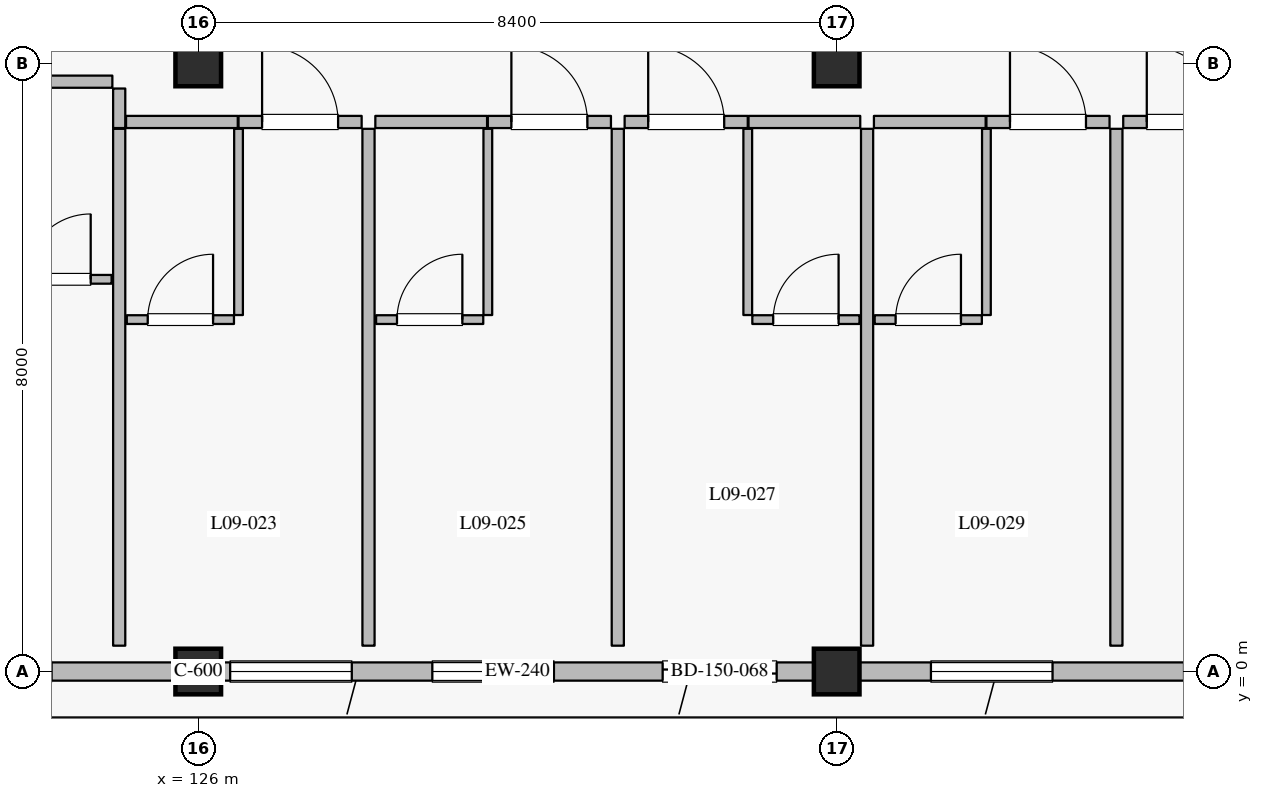
"""IFC4 building model, lengths in metres.
Left out: names, types, materials, properties, quantities, classifications, styles, units other than length and angle.
Written with IfcOpenShell. Run it as: python <this file> out.ifc"""

import sys

from ifc_helpers import new_model, si_unit, direction, frame, frame_2d, origin, origin_2d, place, context, subcontext, project, spatial, rectangle, extrude, element, fill, save


model = new_model("IFC4")
c1 = context("Model", 3, precision=1e-05, world=origin(), true_north=direction((0.0, 1.0)))
c2 = subcontext(c1, "Body", "Model", "MODEL_VIEW")
j1 = project(units=[si_unit("LENGTHUNIT", "METRE"), si_unit("PLANEANGLEUNIT", "RADIAN")], contexts=[c1])
p1 = place(None, origin())
s1 = spatial("IfcSite", under=j1, at=p1, CompositionType="ELEMENT")
p2 = place(p1, origin())
s2 = spatial("IfcBuilding", under=s1, at=p2, CompositionType="ELEMENT")
p3 = place(p2, frame((0.0, 0.0, 39.6)))
s3 = spatial("IfcBuildingStorey", under=s2, at=p3, CompositionType="ELEMENT", Elevation=39.6)
for number, where, z_axis, x_axis in (
    (1, (126.0, 0.0, 0.0), (0.0, 0.0, 1.0), (1.0, 0.0, 0.0)),
    (2, (134.4, 0.0, 0.0), (0.0, 0.0, 1.0), (1.0, 0.0, 0.0)),
    (3, (126.0, 8.0, 0.0), (0.0, 0.0, 1.0), (1.0, 0.0, 0.0)),
    (4, (134.4, 8.0, 0.0), (0.0, 0.0, 1.0), (1.0, 0.0, 0.0)),
):
    element("IfcColumn", number, at=place(p3, frame(where, z_axis=z_axis, x_axis=x_axis)), inside=s3, PredefinedType="COLUMN", context=c2, shape_type="SweptSolid", body=[
        extrude(rectangle(XDim=0.6, YDim=0.6, at=origin_2d()), origin(), (0.0, 0.0, 1.0), 3.6),
    ])
p4 = place(p3, frame((125.7, 0.0, 0.0), z_axis=(0.0, 0.0, 1.0), x_axis=(-1.0, 0.0, 0.0)))
e5 = element("IfcWall", 5, at=p4, inside=s3, PredefinedType="SOLIDWALL", context=c2, shape_type="SweptSolid", body=[
    extrude(rectangle(XDim=7.8, YDim=0.24, at=frame_2d((3.9, 0.0))), origin(), (0.0, 0.0, 1.0), 2.89),
])
p5 = place(p4, frame((1.63, 0.0, 0.0)))
e6 = element("IfcOpeningElement", 6, at=p5, cuts=e5, PredefinedType="OPENING", context=c2, shape_type="SweptSolid", body=[
    extrude(rectangle(XDim=1.5, YDim=2.25, at=frame_2d((0.75, 1.125))), frame((0.0, 0.13, 0.0), z_axis=(0.0, -1.0, 0.0), x_axis=(1.0, 0.0, 0.0)), (0.0, 0.0, 1.0), 0.26),
])
p6 = place(p4, frame((4.86, 0.0, 0.8)))
e7 = element("IfcOpeningElement", 7, at=p6, cuts=e5, PredefinedType="OPENING", context=c2, shape_type="SweptSolid", body=[
    extrude(rectangle(XDim=1.6, YDim=1.6, at=frame_2d((0.8, 0.8))), frame((0.0, 0.13, 0.0), z_axis=(0.0, -1.0, 0.0), x_axis=(1.0, 0.0, 0.0)), (0.0, 0.0, 1.0), 0.26),
])
p7 = place(p3, frame((134.1, 0.0, 0.0), z_axis=(0.0, 0.0, 1.0), x_axis=(-1.0, 0.0, 0.0)))
e8 = element("IfcWall", 8, at=p7, inside=s3, PredefinedType="SOLIDWALL", context=c2, shape_type="SweptSolid", body=[
    extrude(rectangle(XDim=7.8, YDim=0.24, at=frame_2d((3.9, 0.0))), origin(), (0.0, 0.0, 1.0), 2.89),
])
p8 = place(p7, frame((0.49, 0.0, 0.0)))
e9 = element("IfcOpeningElement", 9, at=p8, cuts=e8, PredefinedType="OPENING", context=c2, shape_type="SweptSolid", body=[
    extrude(rectangle(XDim=1.5, YDim=2.25, at=frame_2d((0.75, 1.125))), frame((0.0, 0.13, 0.0), z_axis=(0.0, -1.0, 0.0), x_axis=(1.0, 0.0, 0.0)), (0.0, 0.0, 1.0), 0.26),
])
p9 = place(p7, frame((3.42, 0.0, 0.8)))
e10 = element("IfcOpeningElement", 10, at=p9, cuts=e8, PredefinedType="OPENING", context=c2, shape_type="SweptSolid", body=[
    extrude(rectangle(XDim=1.6, YDim=1.6, at=frame_2d((0.8, 0.8))), frame((0.0, 0.13, 0.0), z_axis=(0.0, -1.0, 0.0), x_axis=(1.0, 0.0, 0.0)), (0.0, 0.0, 1.0), 0.26),
])
p10 = place(p7, frame((6.08, 0.0, 0.8)))
e11 = element("IfcOpeningElement", 11, at=p10, cuts=e8, PredefinedType="OPENING", context=c2, shape_type="SweptSolid", body=[
    extrude(rectangle(XDim=1.6, YDim=1.6, at=frame_2d((0.8, 0.8))), frame((0.0, 0.13, 0.0), z_axis=(0.0, -1.0, 0.0), x_axis=(1.0, 0.0, 0.0)), (0.0, 0.0, 1.0), 0.26),
])
p11 = place(p3, frame((142.5, 0.0, 0.0), z_axis=(0.0, 0.0, 1.0), x_axis=(-1.0, 0.0, 0.0)))
e12 = element("IfcWall", 12, at=p11, inside=s3, PredefinedType="SOLIDWALL", context=c2, shape_type="SweptSolid", body=[
    extrude(rectangle(XDim=7.8, YDim=0.24, at=frame_2d((3.9, 0.0))), origin(), (0.0, 0.0, 1.0), 2.94),
])
p12 = place(p11, frame((2.03, 0.0, 0.0)))
e13 = element("IfcOpeningElement", 13, at=p12, cuts=e12, PredefinedType="OPENING", context=c2, shape_type="SweptSolid", body=[
    extrude(rectangle(XDim=1.5, YDim=2.25, at=frame_2d((0.75, 1.125))), frame((0.0, 0.13, 0.0), z_axis=(0.0, -1.0, 0.0), x_axis=(1.0, 0.0, 0.0)), (0.0, 0.0, 1.0), 0.26),
])
p13 = place(p11, frame((5.26, 0.0, 0.8)))
e14 = element("IfcOpeningElement", 14, at=p13, cuts=e12, PredefinedType="OPENING", context=c2, shape_type="SweptSolid", body=[
    extrude(rectangle(XDim=1.6, YDim=1.6, at=frame_2d((0.8, 0.8))), frame((0.0, 0.13, 0.0), z_axis=(0.0, -1.0, 0.0), x_axis=(1.0, 0.0, 0.0)), (0.0, 0.0, 1.0), 0.26),
])
p14 = place(p3, frame((123.4, 7.76, 0.0), z_axis=(0.0, 0.0, 1.0), x_axis=(1.0, 0.0, 0.0)))
e15 = element("IfcWall", 15, at=p14, inside=s3, PredefinedType="PARTITIONING", context=c2, shape_type="SweptSolid", body=[
    extrude(rectangle(XDim=1.47, YDim=0.16, at=frame_2d((0.735, 0.0))), origin(), (0.0, 0.0, 1.0), 3.335),
])
p15 = place(p3, frame((123.45, 5.16, 0.0), z_axis=(0.0, 0.0, 1.0), x_axis=(1.0, 0.0, 0.0)))
e16 = element("IfcWall", 16, at=p15, inside=s3, PredefinedType="PARTITIONING", context=c2, shape_type="SweptSolid", body=[
    extrude(rectangle(XDim=1.41, YDim=0.115, at=frame_2d((0.705, 0.0))), origin(), (0.0, 0.0, 1.0), 3.335),
])
p16 = place(p15, frame((0.275, 0.0, 0.0)))
e17 = element("IfcOpeningElement", 17, at=p16, cuts=e16, PredefinedType="OPENING", context=c2, shape_type="SweptSolid", body=[
    extrude(rectangle(XDim=0.86, YDim=2.12, at=frame_2d((0.43, 1.06))), frame((0.0, 0.067, 0.0), z_axis=(0.0, -1.0, 0.0), x_axis=(1.0, 0.0, 0.0)), (0.0, 0.0, 1.0), 0.135),
])
p17 = place(p3, frame((124.96, 7.15, 0.0), z_axis=(0.0, 0.0, 1.0), x_axis=(0.0, 1.0, 0.0)))
e18 = element("IfcWall", 18, at=p17, inside=s3, PredefinedType="PARTITIONING", context=c2, shape_type="SweptSolid", body=[
    extrude(rectangle(XDim=0.52, YDim=0.16, at=frame_2d((0.26, 0.0))), origin(), (0.0, 0.0, 1.0), 3.335),
])
p18 = place(p3, frame((125.05, 7.23, 0.0), z_axis=(0.0, 0.0, 1.0), x_axis=(1.0, 0.0, 0.0)))
e19 = element("IfcWall", 19, at=p18, inside=s3, PredefinedType="PARTITIONING", context=c2, shape_type="SweptSolid", body=[
    extrude(rectangle(XDim=1.47, YDim=0.16, at=frame_2d((0.735, 0.0))), origin(), (0.0, 0.0, 1.0), 3.335),
])
p19 = place(p3, frame((126.53, 7.23, 0.0), z_axis=(0.0, 0.0, 1.0), x_axis=(1.0, 0.0, 0.0)))
e20 = element("IfcWall", 20, at=p19, inside=s3, PredefinedType="PARTITIONING", context=c2, shape_type="SweptSolid", body=[
    extrude(rectangle(XDim=1.62, YDim=0.16, at=frame_2d((0.81, 0.0))), origin(), (0.0, 0.0, 1.0), 3.335),
])
p20 = place(p19, frame((0.31, 0.0, 0.0)))
e21 = element("IfcOpeningElement", 21, at=p20, cuts=e20, PredefinedType="OPENING", context=c2, shape_type="SweptSolid", body=[
    extrude(rectangle(XDim=1.0, YDim=2.25, at=frame_2d((0.5, 1.125))), frame((0.0, 0.09, 0.0), z_axis=(0.0, -1.0, 0.0), x_axis=(1.0, 0.0, 0.0)), (0.0, 0.0, 1.0), 0.18),
])
p21 = place(p3, frame((126.53, 4.69, 0.0), z_axis=(0.0, 0.0, 1.0), x_axis=(0.0, 1.0, 0.0)))
e22 = element("IfcWall", 22, at=p21, inside=s3, PredefinedType="PARTITIONING", context=c2, shape_type="SweptSolid", body=[
    extrude(rectangle(XDim=2.45, YDim=0.115, at=frame_2d((1.225, 0.0))), origin(), (0.0, 0.0, 1.0), 3.335),
])
p22 = place(p3, frame((125.06, 4.63, 0.0), z_axis=(0.0, 0.0, 1.0), x_axis=(1.0, 0.0, 0.0)))
e23 = element("IfcWall", 23, at=p22, inside=s3, PredefinedType="PARTITIONING", context=c2, shape_type="SweptSolid", body=[
    extrude(rectangle(XDim=1.41, YDim=0.115, at=frame_2d((0.705, 0.0))), origin(), (0.0, 0.0, 1.0), 3.335),
])
p23 = place(p22, frame((0.275, 0.0, 0.0)))
e24 = element("IfcOpeningElement", 24, at=p23, cuts=e23, PredefinedType="OPENING", context=c2, shape_type="SweptSolid", body=[
    extrude(rectangle(XDim=0.86, YDim=2.12, at=frame_2d((0.43, 1.06))), frame((0.0, 0.067, 0.0), z_axis=(0.0, -1.0, 0.0), x_axis=(1.0, 0.0, 0.0)), (0.0, 0.0, 1.0), 0.135),
])
p24 = place(p3, frame((124.96, 0.34, 0.0), z_axis=(0.0, 0.0, 1.0), x_axis=(0.0, 1.0, 0.0)))
e25 = element("IfcWall", 25, at=p24, inside=s3, PredefinedType="PARTITIONING", context=c2, shape_type="SweptSolid", body=[
    extrude(rectangle(XDim=6.8, YDim=0.16, at=frame_2d((3.4, 0.0))), origin(), (0.0, 0.0, 1.0), 3.335),
])
p25 = place(p3, frame((128.33, 7.23, 0.0), z_axis=(0.0, 0.0, 1.0), x_axis=(1.0, 0.0, 0.0)))
e26 = element("IfcWall", 26, at=p25, inside=s3, PredefinedType="PARTITIONING", context=c2, shape_type="SweptSolid", body=[
    extrude(rectangle(XDim=1.47, YDim=0.16, at=frame_2d((0.735, 0.0))), origin(), (0.0, 0.0, 1.0), 3.335),
])
p26 = place(p3, frame((129.81, 7.23, 0.0), z_axis=(0.0, 0.0, 1.0), x_axis=(1.0, 0.0, 0.0)))
e27 = element("IfcWall", 27, at=p26, inside=s3, PredefinedType="PARTITIONING", context=c2, shape_type="SweptSolid", body=[
    extrude(rectangle(XDim=1.62, YDim=0.16, at=frame_2d((0.81, 0.0))), origin(), (0.0, 0.0, 1.0), 3.335),
])
p27 = place(p26, frame((0.31, 0.0, 0.0)))
e28 = element("IfcOpeningElement", 28, at=p27, cuts=e27, PredefinedType="OPENING", context=c2, shape_type="SweptSolid", body=[
    extrude(rectangle(XDim=1.0, YDim=2.25, at=frame_2d((0.5, 1.125))), frame((0.0, 0.09, 0.0), z_axis=(0.0, -1.0, 0.0), x_axis=(1.0, 0.0, 0.0)), (0.0, 0.0, 1.0), 0.18),
])
p28 = place(p3, frame((129.81, 4.69, 0.0), z_axis=(0.0, 0.0, 1.0), x_axis=(0.0, 1.0, 0.0)))
e29 = element("IfcWall", 29, at=p28, inside=s3, PredefinedType="PARTITIONING", context=c2, shape_type="SweptSolid", body=[
    extrude(rectangle(XDim=2.45, YDim=0.115, at=frame_2d((1.225, 0.0))), origin(), (0.0, 0.0, 1.0), 3.335),
])
p29 = place(p3, frame((128.34, 4.63, 0.0), z_axis=(0.0, 0.0, 1.0), x_axis=(1.0, 0.0, 0.0)))
e30 = element("IfcWall", 30, at=p29, inside=s3, PredefinedType="PARTITIONING", context=c2, shape_type="SweptSolid", body=[
    extrude(rectangle(XDim=1.41, YDim=0.115, at=frame_2d((0.705, 0.0))), origin(), (0.0, 0.0, 1.0), 3.335),
])
p30 = place(p29, frame((0.275, 0.0, 0.0)))
e31 = element("IfcOpeningElement", 31, at=p30, cuts=e30, PredefinedType="OPENING", context=c2, shape_type="SweptSolid", body=[
    extrude(rectangle(XDim=0.86, YDim=2.12, at=frame_2d((0.43, 1.06))), frame((0.0, 0.067, 0.0), z_axis=(0.0, -1.0, 0.0), x_axis=(1.0, 0.0, 0.0)), (0.0, 0.0, 1.0), 0.135),
])
p31 = place(p3, frame((128.24, 0.34, 0.0), z_axis=(0.0, 0.0, 1.0), x_axis=(0.0, 1.0, 0.0)))
e32 = element("IfcWall", 32, at=p31, inside=s3, PredefinedType="PARTITIONING", context=c2, shape_type="SweptSolid", body=[
    extrude(rectangle(XDim=6.8, YDim=0.16, at=frame_2d((3.4, 0.0))), origin(), (0.0, 0.0, 1.0), 3.335),
])
p32 = place(p3, frame((131.61, 7.23, 0.0), z_axis=(0.0, 0.0, 1.0), x_axis=(1.0, 0.0, 0.0)))
e33 = element("IfcWall", 33, at=p32, inside=s3, PredefinedType="PARTITIONING", context=c2, shape_type="SweptSolid", body=[
    extrude(rectangle(XDim=1.62, YDim=0.16, at=frame_2d((0.81, 0.0))), origin(), (0.0, 0.0, 1.0), 3.335),
])
p33 = place(p32, frame((0.31, 0.0, 0.0)))
e34 = element("IfcOpeningElement", 34, at=p33, cuts=e33, PredefinedType="OPENING", context=c2, shape_type="SweptSolid", body=[
    extrude(rectangle(XDim=1.0, YDim=2.25, at=frame_2d((0.5, 1.125))), frame((0.0, 0.09, 0.0), z_axis=(0.0, -1.0, 0.0), x_axis=(1.0, 0.0, 0.0)), (0.0, 0.0, 1.0), 0.18),
])
p34 = place(p3, frame((133.24, 7.23, 0.0), z_axis=(0.0, 0.0, 1.0), x_axis=(1.0, 0.0, 0.0)))
e35 = element("IfcWall", 35, at=p34, inside=s3, PredefinedType="PARTITIONING", context=c2, shape_type="SweptSolid", body=[
    extrude(rectangle(XDim=1.47, YDim=0.16, at=frame_2d((0.735, 0.0))), origin(), (0.0, 0.0, 1.0), 3.335),
])
p35 = place(p3, frame((133.23, 4.69, 0.0), z_axis=(0.0, 0.0, 1.0), x_axis=(0.0, 1.0, 0.0)))
e36 = element("IfcWall", 36, at=p35, inside=s3, PredefinedType="PARTITIONING", context=c2, shape_type="SweptSolid", body=[
    extrude(rectangle(XDim=2.45, YDim=0.115, at=frame_2d((1.225, 0.0))), origin(), (0.0, 0.0, 1.0), 3.335),
])
p36 = place(p3, frame((133.29, 4.63, 0.0), z_axis=(0.0, 0.0, 1.0), x_axis=(1.0, 0.0, 0.0)))
e37 = element("IfcWall", 37, at=p36, inside=s3, PredefinedType="PARTITIONING", context=c2, shape_type="SweptSolid", body=[
    extrude(rectangle(XDim=1.41, YDim=0.115, at=frame_2d((0.705, 0.0))), origin(), (0.0, 0.0, 1.0), 3.335),
])
p37 = place(p36, frame((0.275, 0.0, 0.0)))
e38 = element("IfcOpeningElement", 38, at=p37, cuts=e37, PredefinedType="OPENING", context=c2, shape_type="SweptSolid", body=[
    extrude(rectangle(XDim=0.86, YDim=2.12, at=frame_2d((0.43, 1.06))), frame((0.0, 0.067, 0.0), z_axis=(0.0, -1.0, 0.0), x_axis=(1.0, 0.0, 0.0)), (0.0, 0.0, 1.0), 0.135),
])
p38 = place(p3, frame((131.52, 0.34, 0.0), z_axis=(0.0, 0.0, 1.0), x_axis=(0.0, 1.0, 0.0)))
e39 = element("IfcWall", 39, at=p38, inside=s3, PredefinedType="PARTITIONING", context=c2, shape_type="SweptSolid", body=[
    extrude(rectangle(XDim=6.8, YDim=0.16, at=frame_2d((3.4, 0.0))), origin(), (0.0, 0.0, 1.0), 3.335),
])
p39 = place(p3, frame((134.89, 7.23, 0.0), z_axis=(0.0, 0.0, 1.0), x_axis=(1.0, 0.0, 0.0)))
e40 = element("IfcWall", 40, at=p39, inside=s3, PredefinedType="PARTITIONING", context=c2, shape_type="SweptSolid", body=[
    extrude(rectangle(XDim=1.47, YDim=0.16, at=frame_2d((0.735, 0.0))), origin(), (0.0, 0.0, 1.0), 3.335),
])
p40 = place(p3, frame((136.37, 7.23, 0.0), z_axis=(0.0, 0.0, 1.0), x_axis=(1.0, 0.0, 0.0)))
e41 = element("IfcWall", 41, at=p40, inside=s3, PredefinedType="PARTITIONING", context=c2, shape_type="SweptSolid", body=[
    extrude(rectangle(XDim=1.62, YDim=0.16, at=frame_2d((0.81, 0.0))), origin(), (0.0, 0.0, 1.0), 3.335),
])
p41 = place(p40, frame((0.31, 0.0, 0.0)))
e42 = element("IfcOpeningElement", 42, at=p41, cuts=e41, PredefinedType="OPENING", context=c2, shape_type="SweptSolid", body=[
    extrude(rectangle(XDim=1.0, YDim=2.25, at=frame_2d((0.5, 1.125))), frame((0.0, 0.09, 0.0), z_axis=(0.0, -1.0, 0.0), x_axis=(1.0, 0.0, 0.0)), (0.0, 0.0, 1.0), 0.18),
])
p42 = place(p3, frame((136.37, 4.69, 0.0), z_axis=(0.0, 0.0, 1.0), x_axis=(0.0, 1.0, 0.0)))
e43 = element("IfcWall", 43, at=p42, inside=s3, PredefinedType="PARTITIONING", context=c2, shape_type="SweptSolid", body=[
    extrude(rectangle(XDim=2.45, YDim=0.115, at=frame_2d((1.225, 0.0))), origin(), (0.0, 0.0, 1.0), 3.335),
])
p43 = place(p3, frame((134.9, 4.63, 0.0), z_axis=(0.0, 0.0, 1.0), x_axis=(1.0, 0.0, 0.0)))
e44 = element("IfcWall", 44, at=p43, inside=s3, PredefinedType="PARTITIONING", context=c2, shape_type="SweptSolid", body=[
    extrude(rectangle(XDim=1.41, YDim=0.115, at=frame_2d((0.705, 0.0))), origin(), (0.0, 0.0, 1.0), 3.335),
])
p44 = place(p43, frame((0.275, 0.0, 0.0)))
e45 = element("IfcOpeningElement", 45, at=p44, cuts=e44, PredefinedType="OPENING", context=c2, shape_type="SweptSolid", body=[
    extrude(rectangle(XDim=0.86, YDim=2.12, at=frame_2d((0.43, 1.06))), frame((0.0, 0.067, 0.0), z_axis=(0.0, -1.0, 0.0), x_axis=(1.0, 0.0, 0.0)), (0.0, 0.0, 1.0), 0.135),
])
p45 = place(p3, frame((134.8, 0.34, 0.0), z_axis=(0.0, 0.0, 1.0), x_axis=(0.0, 1.0, 0.0)))
e46 = element("IfcWall", 46, at=p45, inside=s3, PredefinedType="PARTITIONING", context=c2, shape_type="SweptSolid", body=[
    extrude(rectangle(XDim=6.8, YDim=0.16, at=frame_2d((3.4, 0.0))), origin(), (0.0, 0.0, 1.0), 3.335),
])
p46 = place(p3, frame((138.17, 7.23, 0.0), z_axis=(0.0, 0.0, 1.0), x_axis=(1.0, 0.0, 0.0)))
e47 = element("IfcWall", 47, at=p46, inside=s3, PredefinedType="PARTITIONING", context=c2, shape_type="SweptSolid", body=[
    extrude(rectangle(XDim=1.62, YDim=0.16, at=frame_2d((0.81, 0.0))), origin(), (0.0, 0.0, 1.0), 3.335),
])
p47 = place(p46, frame((0.31, 0.0, 0.0)))
e48 = element("IfcOpeningElement", 48, at=p47, cuts=e47, PredefinedType="OPENING", context=c2, shape_type="SweptSolid", body=[
    extrude(rectangle(XDim=1.0, YDim=2.25, at=frame_2d((0.5, 1.125))), frame((0.0, 0.09, 0.0), z_axis=(0.0, -1.0, 0.0), x_axis=(1.0, 0.0, 0.0)), (0.0, 0.0, 1.0), 0.18),
])
p48 = place(p3, frame((138.08, 0.34, 0.0), z_axis=(0.0, 0.0, 1.0), x_axis=(0.0, 1.0, 0.0)))
e49 = element("IfcWall", 49, at=p48, inside=s3, PredefinedType="PARTITIONING", context=c2, shape_type="SweptSolid", body=[
    extrude(rectangle(XDim=6.8, YDim=0.16, at=frame_2d((3.4, 0.0))), origin(), (0.0, 0.0, 1.0), 3.335),
])
p49 = place(p8, origin())
e50 = element("IfcDoor", 50, at=p49, inside=s3, OperationType="SLIDING_TO_LEFT", PredefinedType="DOOR", context=c2, shape_type="SweptSolid", body=[
    extrude(rectangle(XDim=1.5, YDim=2.25, at=frame_2d((0.75, 1.125))), frame((0.0, 0.025, 0.0), z_axis=(0.0, -1.0, 0.0), x_axis=(1.0, 0.0, 0.0)), (0.0, 0.0, 1.0), 0.05),
])
fill(e9, e50)
p50 = place(p9, origin())
e51 = element("IfcWindow", 51, at=p50, inside=s3, PartitioningType="SINGLE_PANEL", PredefinedType="WINDOW", context=c2, shape_type="SweptSolid", body=[
    extrude(rectangle(XDim=1.6, YDim=1.6, at=frame_2d((0.8, 0.8))), frame((0.0, 0.03, 0.0), z_axis=(0.0, -1.0, 0.0), x_axis=(1.0, 0.0, 0.0)), (0.0, 0.0, 1.0), 0.06),
])
fill(e10, e51)
p51 = place(p10, origin())
e52 = element("IfcWindow", 52, at=p51, inside=s3, PartitioningType="SINGLE_PANEL", PredefinedType="WINDOW", context=c2, shape_type="SweptSolid", body=[
    extrude(rectangle(XDim=1.6, YDim=1.6, at=frame_2d((0.8, 0.8))), frame((0.0, 0.03, 0.0), z_axis=(0.0, -1.0, 0.0), x_axis=(1.0, 0.0, 0.0)), (0.0, 0.0, 1.0), 0.06),
])
fill(e11, e52)
p52 = place(p13, origin())
e53 = element("IfcWindow", 53, at=p52, inside=s3, PartitioningType="SINGLE_PANEL", PredefinedType="WINDOW", context=c2, shape_type="SweptSolid", body=[
    extrude(rectangle(XDim=1.6, YDim=1.6, at=frame_2d((0.8, 0.8))), frame((0.0, 0.03, 0.0), z_axis=(0.0, -1.0, 0.0), x_axis=(1.0, 0.0, 0.0)), (0.0, 0.0, 1.0), 0.06),
])
fill(e14, e53)
p53 = place(p16, origin())
e54 = element("IfcDoor", 54, at=p53, inside=s3, OperationType="SINGLE_SWING_RIGHT", PredefinedType="DOOR", context=c2, shape_type="SweptSolid", body=[
    extrude(rectangle(XDim=0.86, YDim=2.12, at=frame_2d((0.43, 1.06))), frame((0.0, 0.025, 0.0), z_axis=(0.0, -1.0, 0.0), x_axis=(1.0, 0.0, 0.0)), (0.0, 0.0, 1.0), 0.05),
])
fill(e17, e54)
p54 = place(p20, origin())
e55 = element("IfcDoor", 55, at=p54, inside=s3, OperationType="SINGLE_SWING_LEFT", PredefinedType="DOOR", context=c2, shape_type="SweptSolid", body=[
    extrude(rectangle(XDim=1.0, YDim=2.25, at=frame_2d((0.5, 1.125))), frame((0.0, 0.025, 0.0), z_axis=(0.0, -1.0, 0.0), x_axis=(1.0, 0.0, 0.0)), (0.0, 0.0, 1.0), 0.05),
])
fill(e21, e55)
p55 = place(p23, origin())
e56 = element("IfcDoor", 56, at=p55, inside=s3, OperationType="SINGLE_SWING_RIGHT", PredefinedType="DOOR", context=c2, shape_type="SweptSolid", body=[
    extrude(rectangle(XDim=0.86, YDim=2.12, at=frame_2d((0.43, 1.06))), frame((0.0, 0.025, 0.0), z_axis=(0.0, -1.0, 0.0), x_axis=(1.0, 0.0, 0.0)), (0.0, 0.0, 1.0), 0.05),
])
fill(e24, e56)
p56 = place(p27, origin())
e57 = element("IfcDoor", 57, at=p56, inside=s3, OperationType="SINGLE_SWING_LEFT", PredefinedType="DOOR", context=c2, shape_type="SweptSolid", body=[
    extrude(rectangle(XDim=1.0, YDim=2.25, at=frame_2d((0.5, 1.125))), frame((0.0, 0.025, 0.0), z_axis=(0.0, -1.0, 0.0), x_axis=(1.0, 0.0, 0.0)), (0.0, 0.0, 1.0), 0.05),
])
fill(e28, e57)
p57 = place(p30, origin())
e58 = element("IfcDoor", 58, at=p57, inside=s3, OperationType="SINGLE_SWING_RIGHT", PredefinedType="DOOR", context=c2, shape_type="SweptSolid", body=[
    extrude(rectangle(XDim=0.86, YDim=2.12, at=frame_2d((0.43, 1.06))), frame((0.0, 0.025, 0.0), z_axis=(0.0, -1.0, 0.0), x_axis=(1.0, 0.0, 0.0)), (0.0, 0.0, 1.0), 0.05),
])
fill(e31, e58)
p58 = place(p33, origin())
e59 = element("IfcDoor", 59, at=p58, inside=s3, OperationType="SINGLE_SWING_LEFT", PredefinedType="DOOR", context=c2, shape_type="SweptSolid", body=[
    extrude(rectangle(XDim=1.0, YDim=2.25, at=frame_2d((0.5, 1.125))), frame((0.0, 0.025, 0.0), z_axis=(0.0, -1.0, 0.0), x_axis=(1.0, 0.0, 0.0)), (0.0, 0.0, 1.0), 0.05),
])
fill(e34, e59)
p59 = place(p37, origin())
e60 = element("IfcDoor", 60, at=p59, inside=s3, OperationType="SINGLE_SWING_RIGHT", PredefinedType="DOOR", context=c2, shape_type="SweptSolid", body=[
    extrude(rectangle(XDim=0.86, YDim=2.12, at=frame_2d((0.43, 1.06))), frame((0.0, 0.025, 0.0), z_axis=(0.0, -1.0, 0.0), x_axis=(1.0, 0.0, 0.0)), (0.0, 0.0, 1.0), 0.05),
])
fill(e38, e60)
p60 = place(p41, origin())
e61 = element("IfcDoor", 61, at=p60, inside=s3, OperationType="SINGLE_SWING_LEFT", PredefinedType="DOOR", context=c2, shape_type="SweptSolid", body=[
    extrude(rectangle(XDim=1.0, YDim=2.25, at=frame_2d((0.5, 1.125))), frame((0.0, 0.025, 0.0), z_axis=(0.0, -1.0, 0.0), x_axis=(1.0, 0.0, 0.0)), (0.0, 0.0, 1.0), 0.05),
])
fill(e42, e61)
p61 = place(p44, origin())
e62 = element("IfcDoor", 62, at=p61, inside=s3, OperationType="SINGLE_SWING_RIGHT", PredefinedType="DOOR", context=c2, shape_type="SweptSolid", body=[
    extrude(rectangle(XDim=0.86, YDim=2.12, at=frame_2d((0.43, 1.06))), frame((0.0, 0.025, 0.0), z_axis=(0.0, -1.0, 0.0), x_axis=(1.0, 0.0, 0.0)), (0.0, 0.0, 1.0), 0.05),
])
fill(e45, e62)
p62 = place(p47, origin())
e63 = element("IfcDoor", 63, at=p62, inside=s3, OperationType="SINGLE_SWING_LEFT", PredefinedType="DOOR", context=c2, shape_type="SweptSolid", body=[
    extrude(rectangle(XDim=1.0, YDim=2.25, at=frame_2d((0.5, 1.125))), frame((0.0, 0.025, 0.0), z_axis=(0.0, -1.0, 0.0), x_axis=(1.0, 0.0, 0.0)), (0.0, 0.0, 1.0), 0.05),
])
fill(e48, e63)
save(model, sys.argv[1])
